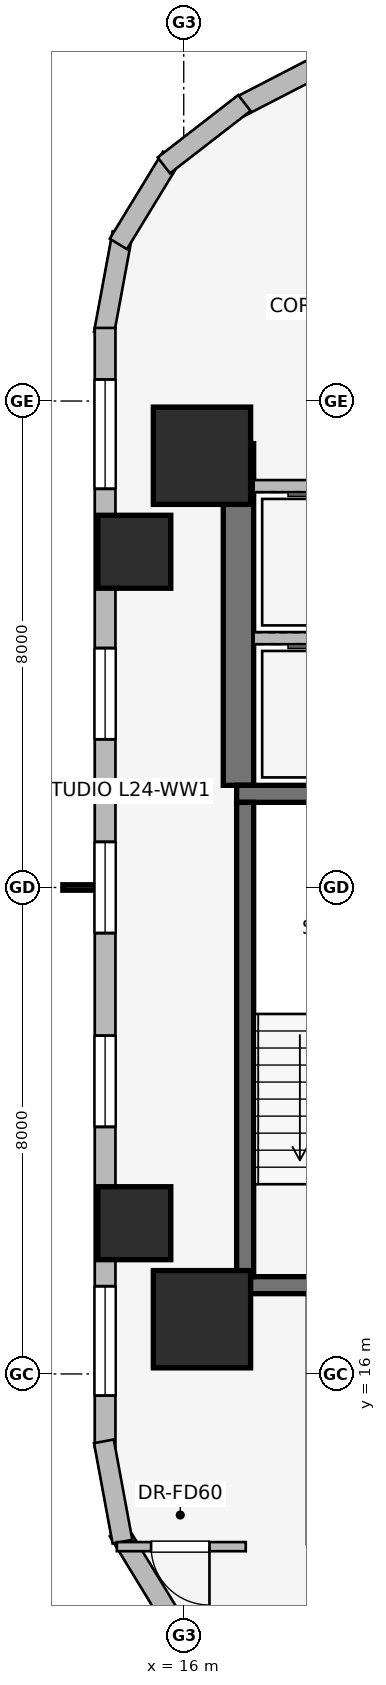
"""IFC4 building model, lengths in metres.
Left out: names, types, materials, properties, quantities, classifications, styles, units other than length and angle.
Written with IfcOpenShell. Run it as: python <this file> out.ifc"""

import sys

from ifc_helpers import new_model, si_unit, direction, frame, frame_2d, origin, origin_2d, place, context, subcontext, project, spatial, rectangle, extrude, element, fill, save


model = new_model("IFC4")
c1 = context("Model", 3, precision=1e-05, world=origin(), true_north=direction((0.0, 1.0)))
c2 = subcontext(c1, "Body", "Model", "MODEL_VIEW")
j1 = project(units=[si_unit("LENGTHUNIT", "METRE"), si_unit("PLANEANGLEUNIT", "RADIAN")], contexts=[c1])
p1 = place(None, origin())
s1 = spatial("IfcSite", under=j1, at=p1, CompositionType="ELEMENT")
p2 = place(p1, origin())
s2 = spatial("IfcBuilding", under=s1, at=p2, CompositionType="ELEMENT")
p3 = place(p2, frame((0.0, 0.0, 92.7)))
s3 = spatial("IfcBuildingStorey", under=s2, at=p3, CompositionType="ELEMENT", Elevation=92.7)
p4 = place(p3, frame((16.9, 25.68, 0.0), z_axis=(0.0, 0.0, 1.0), x_axis=(0.0, 1.0, 0.0)))
e1 = element("IfcWall", 1, at=p4, inside=s3, PredefinedType="SHEAR", context=c2, shape_type="SweptSolid", body=[
    extrude(rectangle(XDim=5.62, YDim=0.5, at=frame_2d((2.81, 0.0))), origin(), (0.0, 0.0, 1.0), 3.65),
])
for number, where, z_axis, x_axis in (
    (2, (16.87, 17.46, 0.0), (0.0, 0.0, 1.0), (1.0, 0.0, 0.0)),
    (3, (20.63, 25.54, 0.0), (0.0, 0.0, 1.0), (-1.0, 0.0, 0.0)),
):
    element("IfcWall", number, at=place(p3, frame(where, z_axis=z_axis, x_axis=x_axis)), inside=s3, PredefinedType="SHEAR", context=c2, shape_type="SweptSolid", body=[
        extrude(rectangle(XDim=3.76, YDim=0.28, at=frame_2d((1.88, 0.0))), origin(), (0.0, 0.0, 1.0), 3.65),
    ])
p5 = place(p3, frame((17.01, 25.4, 0.0), z_axis=(0.0, 0.0, 1.0), x_axis=(0.0, -1.0, 0.0)))
e4 = element("IfcWall", 4, at=p5, inside=s3, PredefinedType="SHEAR", context=c2, shape_type="SweptSolid", body=[
    extrude(rectangle(XDim=7.8, YDim=0.28, at=frame_2d((3.9, 0.0))), origin(), (0.0, 0.0, 1.0), 3.65),
])
for number, where, z_axis, x_axis in (
    (5, (16.3, 16.9, 0.0), (0.0, 0.0, 1.0), (1.0, 0.0, 0.0)),
    (6, (16.3, 31.1, 0.0), (0.0, 0.0, 1.0), (1.0, 0.0, 0.0)),
):
    element("IfcColumn", number, at=place(p3, frame(where, z_axis=z_axis, x_axis=x_axis)), inside=s3, PredefinedType="COLUMN", context=c2, shape_type="SweptSolid", body=[
        extrude(rectangle(XDim=1.6, YDim=1.6, at=origin_2d()), origin(), (0.0, 0.0, 1.0), 3.65),
    ])
for number, where, z_axis, x_axis in (
    (7, (15.187, 29.521, 0.0), (0.0, 0.0, 1.0), (1.0, 0.0, 0.0)),
    (8, (15.187, 18.479, 0.0), (0.0, 0.0, 1.0), (1.0, 0.0, 0.0)),
):
    element("IfcColumn", number, at=place(p3, frame(where, z_axis=z_axis, x_axis=x_axis)), inside=s3, PredefinedType="COLUMN", context=c2, shape_type="SweptSolid", body=[
        extrude(rectangle(XDim=1.2, YDim=1.2, at=origin_2d()), origin(), (0.0, 0.0, 1.0), 3.65),
    ])
p6 = place(p3, frame((16.924, 36.841, 0.0), z_axis=(0.0, 0.0, 1.0), x_axis=(0.888634413993, 0.458616264721, 0.0)))
e9 = element("IfcWall", 9, at=p6, inside=s3, PredefinedType="STANDARD", context=c2, shape_type="SweptSolid", body=[
    extrude(rectangle(XDim=20.531, YDim=0.34, at=frame_2d((10.266, 0.0))), origin(), (0.0, 0.0, 1.0), 2.634),
])
p7 = place(p6, frame((2.161, 0.0, 0.75)))
e10 = element("IfcOpeningElement", 10, at=p7, cuts=e9, PredefinedType="OPENING", context=c2, shape_type="SweptSolid", body=[
    extrude(rectangle(XDim=1.05, YDim=1.4, at=frame_2d((0.525, 0.7))), frame((0.0, 0.18, 0.0), z_axis=(0.0, -1.0, 0.0), x_axis=(1.0, 0.0, 0.0)), (0.0, 0.0, 1.0), 0.36),
])
p8 = place(p6, frame((5.903, 0.0, 0.75)))
e11 = element("IfcOpeningElement", 11, at=p8, cuts=e9, PredefinedType="OPENING", context=c2, shape_type="SweptSolid", body=[
    extrude(rectangle(XDim=1.5, YDim=1.5, at=frame_2d((0.75, 0.75))), frame((0.0, 0.18, 0.0), z_axis=(0.0, -1.0, 0.0), x_axis=(1.0, 0.0, 0.0)), (0.0, 0.0, 1.0), 0.36),
])
p9 = place(p6, frame((9.516, 0.0, 0.75)))
e12 = element("IfcOpeningElement", 12, at=p9, cuts=e9, PredefinedType="OPENING", context=c2, shape_type="SweptSolid", body=[
    extrude(rectangle(XDim=1.5, YDim=1.5, at=frame_2d((0.75, 0.75))), frame((0.0, 0.18, 0.0), z_axis=(0.0, -1.0, 0.0), x_axis=(1.0, 0.0, 0.0)), (0.0, 0.0, 1.0), 0.36),
])
p10 = place(p6, frame((13.129, 0.0, 0.75)))
e13 = element("IfcOpeningElement", 13, at=p10, cuts=e9, PredefinedType="OPENING", context=c2, shape_type="SweptSolid", body=[
    extrude(rectangle(XDim=1.5, YDim=1.5, at=frame_2d((0.75, 0.75))), frame((0.0, 0.18, 0.0), z_axis=(0.0, -1.0, 0.0), x_axis=(1.0, 0.0, 0.0)), (0.0, 0.0, 1.0), 0.36),
])
p11 = place(p6, frame((17.476, 0.0, 0.75)))
e14 = element("IfcOpeningElement", 14, at=p11, cuts=e9, PredefinedType="OPENING", context=c2, shape_type="SweptSolid", body=[
    extrude(rectangle(XDim=1.05, YDim=1.4, at=frame_2d((0.525, 0.7))), frame((0.0, 0.18, 0.0), z_axis=(0.0, -1.0, 0.0), x_axis=(1.0, 0.0, 0.0)), (0.0, 0.0, 1.0), 0.36),
])
p12 = place(p3, frame((14.687, 33.108, 0.0), z_axis=(0.0, 0.0, 1.0), x_axis=(0.181714143354, 0.983351397063, 0.0)))
e15 = element("IfcWall", 15, at=p12, inside=s3, PredefinedType="STANDARD", context=c2, shape_type="SweptSolid", body=[
    extrude(rectangle(XDim=1.678, YDim=0.33, at=frame_2d((0.839, 0.0))), origin(), (0.0, 0.0, 1.0), 3.34),
])
p13 = place(p3, frame((14.925, 34.583, 0.0), z_axis=(0.0, 0.0, 1.0), x_axis=(0.520584129191, 0.853810379671, 0.0)))
e16 = element("IfcWall", 16, at=p13, inside=s3, PredefinedType="STANDARD", context=c2, shape_type="SweptSolid", body=[
    extrude(rectangle(XDim=1.677, YDim=0.33, at=frame_2d((0.838, 0.0))), origin(), (0.0, 0.0, 1.0), 3.34),
])
p14 = place(p3, frame((15.673, 35.875, 0.0), z_axis=(0.0, 0.0, 1.0), x_axis=(0.790691856293, 0.61221433207, 0.0)))
e17 = element("IfcWall", 17, at=p14, inside=s3, PredefinedType="STANDARD", context=c2, shape_type="SweptSolid", body=[
    extrude(rectangle(XDim=1.676, YDim=0.33, at=frame_2d((0.838, 0.0))), origin(), (0.0, 0.0, 1.0), 3.34),
])
p15 = place(p3, frame((14.707, 14.798, 0.0), z_axis=(0.0, 0.0, 1.0), x_axis=(0.0, 1.0, 0.0)))
e18 = element("IfcWall", 18, at=p15, inside=s3, PredefinedType="STANDARD", context=c2, shape_type="SweptSolid", body=[
    extrude(rectangle(XDim=18.404, YDim=0.34, at=frame_2d((9.202, 0.0))), origin(), (0.0, 0.0, 1.0), 2.634),
])
p16 = place(p15, frame((0.845, 0.0, 0.75)))
e19 = element("IfcOpeningElement", 19, at=p16, cuts=e18, PredefinedType="OPENING", context=c2, shape_type="SweptSolid", body=[
    extrude(rectangle(XDim=1.8, YDim=1.5, at=frame_2d((0.9, 0.75))), frame((0.0, 0.18, 0.0), z_axis=(0.0, -1.0, 0.0), x_axis=(1.0, 0.0, 0.0)), (0.0, 0.0, 1.0), 0.36),
])
p17 = place(p15, frame((5.265, 0.0, 0.75)))
e20 = element("IfcOpeningElement", 20, at=p17, cuts=e18, PredefinedType="OPENING", context=c2, shape_type="SweptSolid", body=[
    extrude(rectangle(XDim=1.5, YDim=1.5, at=frame_2d((0.75, 0.75))), frame((0.0, 0.18, 0.0), z_axis=(0.0, -1.0, 0.0), x_axis=(1.0, 0.0, 0.0)), (0.0, 0.0, 1.0), 0.36),
])
p18 = place(p15, frame((8.452, 0.0, 0.75)))
e21 = element("IfcOpeningElement", 21, at=p18, cuts=e18, PredefinedType="OPENING", context=c2, shape_type="SweptSolid", body=[
    extrude(rectangle(XDim=1.5, YDim=1.5, at=frame_2d((0.75, 0.75))), frame((0.0, 0.18, 0.0), z_axis=(0.0, -1.0, 0.0), x_axis=(1.0, 0.0, 0.0)), (0.0, 0.0, 1.0), 0.36),
])
p19 = place(p15, frame((11.639, 0.0, 0.75)))
e22 = element("IfcOpeningElement", 22, at=p19, cuts=e18, PredefinedType="OPENING", context=c2, shape_type="SweptSolid", body=[
    extrude(rectangle(XDim=1.5, YDim=1.5, at=frame_2d((0.75, 0.75))), frame((0.0, 0.18, 0.0), z_axis=(0.0, -1.0, 0.0), x_axis=(1.0, 0.0, 0.0)), (0.0, 0.0, 1.0), 0.36),
])
p20 = place(p15, frame((15.758, 0.0, 0.75)))
e23 = element("IfcOpeningElement", 23, at=p20, cuts=e18, PredefinedType="OPENING", context=c2, shape_type="SweptSolid", body=[
    extrude(rectangle(XDim=1.8, YDim=1.5, at=frame_2d((0.9, 0.75))), frame((0.0, 0.18, 0.0), z_axis=(0.0, -1.0, 0.0), x_axis=(1.0, 0.0, 0.0)), (0.0, 0.0, 1.0), 0.36),
])
p21 = place(p3, frame((16.998, 11.099, 0.0), z_axis=(0.0, 0.0, 1.0), x_axis=(-0.790691856293, 0.61221433207, 0.0)))
e24 = element("IfcWall", 24, at=p21, inside=s3, PredefinedType="STANDARD", context=c2, shape_type="SweptSolid", body=[
    extrude(rectangle(XDim=1.676, YDim=0.33, at=frame_2d((0.838, 0.0))), origin(), (0.0, 0.0, 1.0), 3.34),
])
p22 = place(p3, frame((15.798, 11.985, 0.0), z_axis=(0.0, 0.0, 1.0), x_axis=(-0.520584129191, 0.853810379671, 0.0)))
e25 = element("IfcWall", 25, at=p22, inside=s3, PredefinedType="STANDARD", context=c2, shape_type="SweptSolid", body=[
    extrude(rectangle(XDim=1.677, YDim=0.33, at=frame_2d((0.838, 0.0))), origin(), (0.0, 0.0, 1.0), 3.34),
])
p23 = place(p3, frame((14.992, 13.242, 0.0), z_axis=(0.0, 0.0, 1.0), x_axis=(-0.181714143354, 0.983351397063, 0.0)))
e26 = element("IfcWall", 26, at=p23, inside=s3, PredefinedType="STANDARD", context=c2, shape_type="SweptSolid", body=[
    extrude(rectangle(XDim=1.678, YDim=0.33, at=frame_2d((0.839, 0.0))), origin(), (0.0, 0.0, 1.0), 3.34),
])
p24 = place(p3, frame((17.15, 28.1, 0.0), z_axis=(0.0, 0.0, 1.0), x_axis=(1.0, 0.0, 0.0)))
e27 = element("IfcWall", 27, at=p24, inside=s3, PredefinedType="PARTITIONING", context=c2, shape_type="SweptSolid", body=[
    extrude(rectangle(XDim=2.5, YDim=0.2, at=frame_2d((1.25, 0.0))), origin(), (0.0, 0.0, 1.0), 3.34),
])
p25 = place(p3, frame((19.65, 30.6, 0.0), z_axis=(0.0, 0.0, 1.0), x_axis=(-1.0, 0.0, 0.0)))
e28 = element("IfcWall", 28, at=p25, inside=s3, PredefinedType="PARTITIONING", context=c2, shape_type="SweptSolid", body=[
    extrude(rectangle(XDim=2.5, YDim=0.2, at=frame_2d((1.25, 0.0))), origin(), (0.0, 0.0, 1.0), 2.24),
])
p26 = place(p3, frame((17.02, 13.16, 0.0), z_axis=(0.0, 0.0, 1.0), x_axis=(-1.0, 0.0, 0.0)))
e29 = element("IfcWall", 29, at=p26, inside=s3, PredefinedType="PARTITIONING", context=c2, shape_type="SweptSolid", body=[
    extrude(rectangle(XDim=2.12, YDim=0.15, at=frame_2d((1.06, 0.0))), origin(), (0.0, 0.0, 1.0), 3.34),
])
p27 = place(p26, frame((0.597, 0.0, 0.0)))
e30 = element("IfcOpeningElement", 30, at=p27, cuts=e29, PredefinedType="OPENING", context=c2, shape_type="SweptSolid", body=[
    extrude(rectangle(XDim=0.96, YDim=2.0, at=frame_2d((0.48, 1.0))), frame((0.0, 0.085, 0.0), z_axis=(0.0, -1.0, 0.0), x_axis=(1.0, 0.0, 0.0)), (0.0, 0.0, 1.0), 0.17),
])
p28 = place(p16, origin())
e31 = element("IfcWindow", 31, at=p28, inside=s3, PartitioningType="SINGLE_PANEL", PredefinedType="WINDOW", context=c2, shape_type="SweptSolid", body=[
    extrude(rectangle(XDim=1.8, YDim=1.5, at=frame_2d((0.9, 0.75))), frame((0.0, 0.03, 0.0), z_axis=(0.0, -1.0, 0.0), x_axis=(1.0, 0.0, 0.0)), (0.0, 0.0, 1.0), 0.06),
])
fill(e19, e31)
p29 = place(p17, origin())
e32 = element("IfcWindow", 32, at=p29, inside=s3, PartitioningType="SINGLE_PANEL", PredefinedType="WINDOW", context=c2, shape_type="SweptSolid", body=[
    extrude(rectangle(XDim=1.5, YDim=1.5, at=frame_2d((0.75, 0.75))), frame((0.0, 0.03, 0.0), z_axis=(0.0, -1.0, 0.0), x_axis=(1.0, 0.0, 0.0)), (0.0, 0.0, 1.0), 0.06),
])
fill(e20, e32)
p30 = place(p18, origin())
e33 = element("IfcWindow", 33, at=p30, inside=s3, PartitioningType="SINGLE_PANEL", PredefinedType="WINDOW", context=c2, shape_type="SweptSolid", body=[
    extrude(rectangle(XDim=1.5, YDim=1.5, at=frame_2d((0.75, 0.75))), frame((0.0, 0.03, 0.0), z_axis=(0.0, -1.0, 0.0), x_axis=(1.0, 0.0, 0.0)), (0.0, 0.0, 1.0), 0.06),
])
fill(e21, e33)
p31 = place(p19, origin())
e34 = element("IfcWindow", 34, at=p31, inside=s3, PartitioningType="SINGLE_PANEL", PredefinedType="WINDOW", context=c2, shape_type="SweptSolid", body=[
    extrude(rectangle(XDim=1.5, YDim=1.5, at=frame_2d((0.75, 0.75))), frame((0.0, 0.03, 0.0), z_axis=(0.0, -1.0, 0.0), x_axis=(1.0, 0.0, 0.0)), (0.0, 0.0, 1.0), 0.06),
])
fill(e22, e34)
p32 = place(p20, origin())
e35 = element("IfcWindow", 35, at=p32, inside=s3, PartitioningType="SINGLE_PANEL", PredefinedType="WINDOW", context=c2, shape_type="SweptSolid", body=[
    extrude(rectangle(XDim=1.8, YDim=1.5, at=frame_2d((0.9, 0.75))), frame((0.0, 0.03, 0.0), z_axis=(0.0, -1.0, 0.0), x_axis=(1.0, 0.0, 0.0)), (0.0, 0.0, 1.0), 0.06),
])
fill(e23, e35)
p33 = place(p27, origin())
e36 = element("IfcDoor", 36, at=p33, inside=s3, OperationType="SINGLE_SWING_LEFT", PredefinedType="DOOR", context=c2, shape_type="SweptSolid", body=[
    extrude(rectangle(XDim=0.96, YDim=2.0, at=frame_2d((0.48, 1.0))), frame((0.0, 0.025, 0.0), z_axis=(0.0, -1.0, 0.0), x_axis=(1.0, 0.0, 0.0)), (0.0, 0.0, 1.0), 0.05),
])
fill(e30, e36)
save(model, sys.argv[1])
